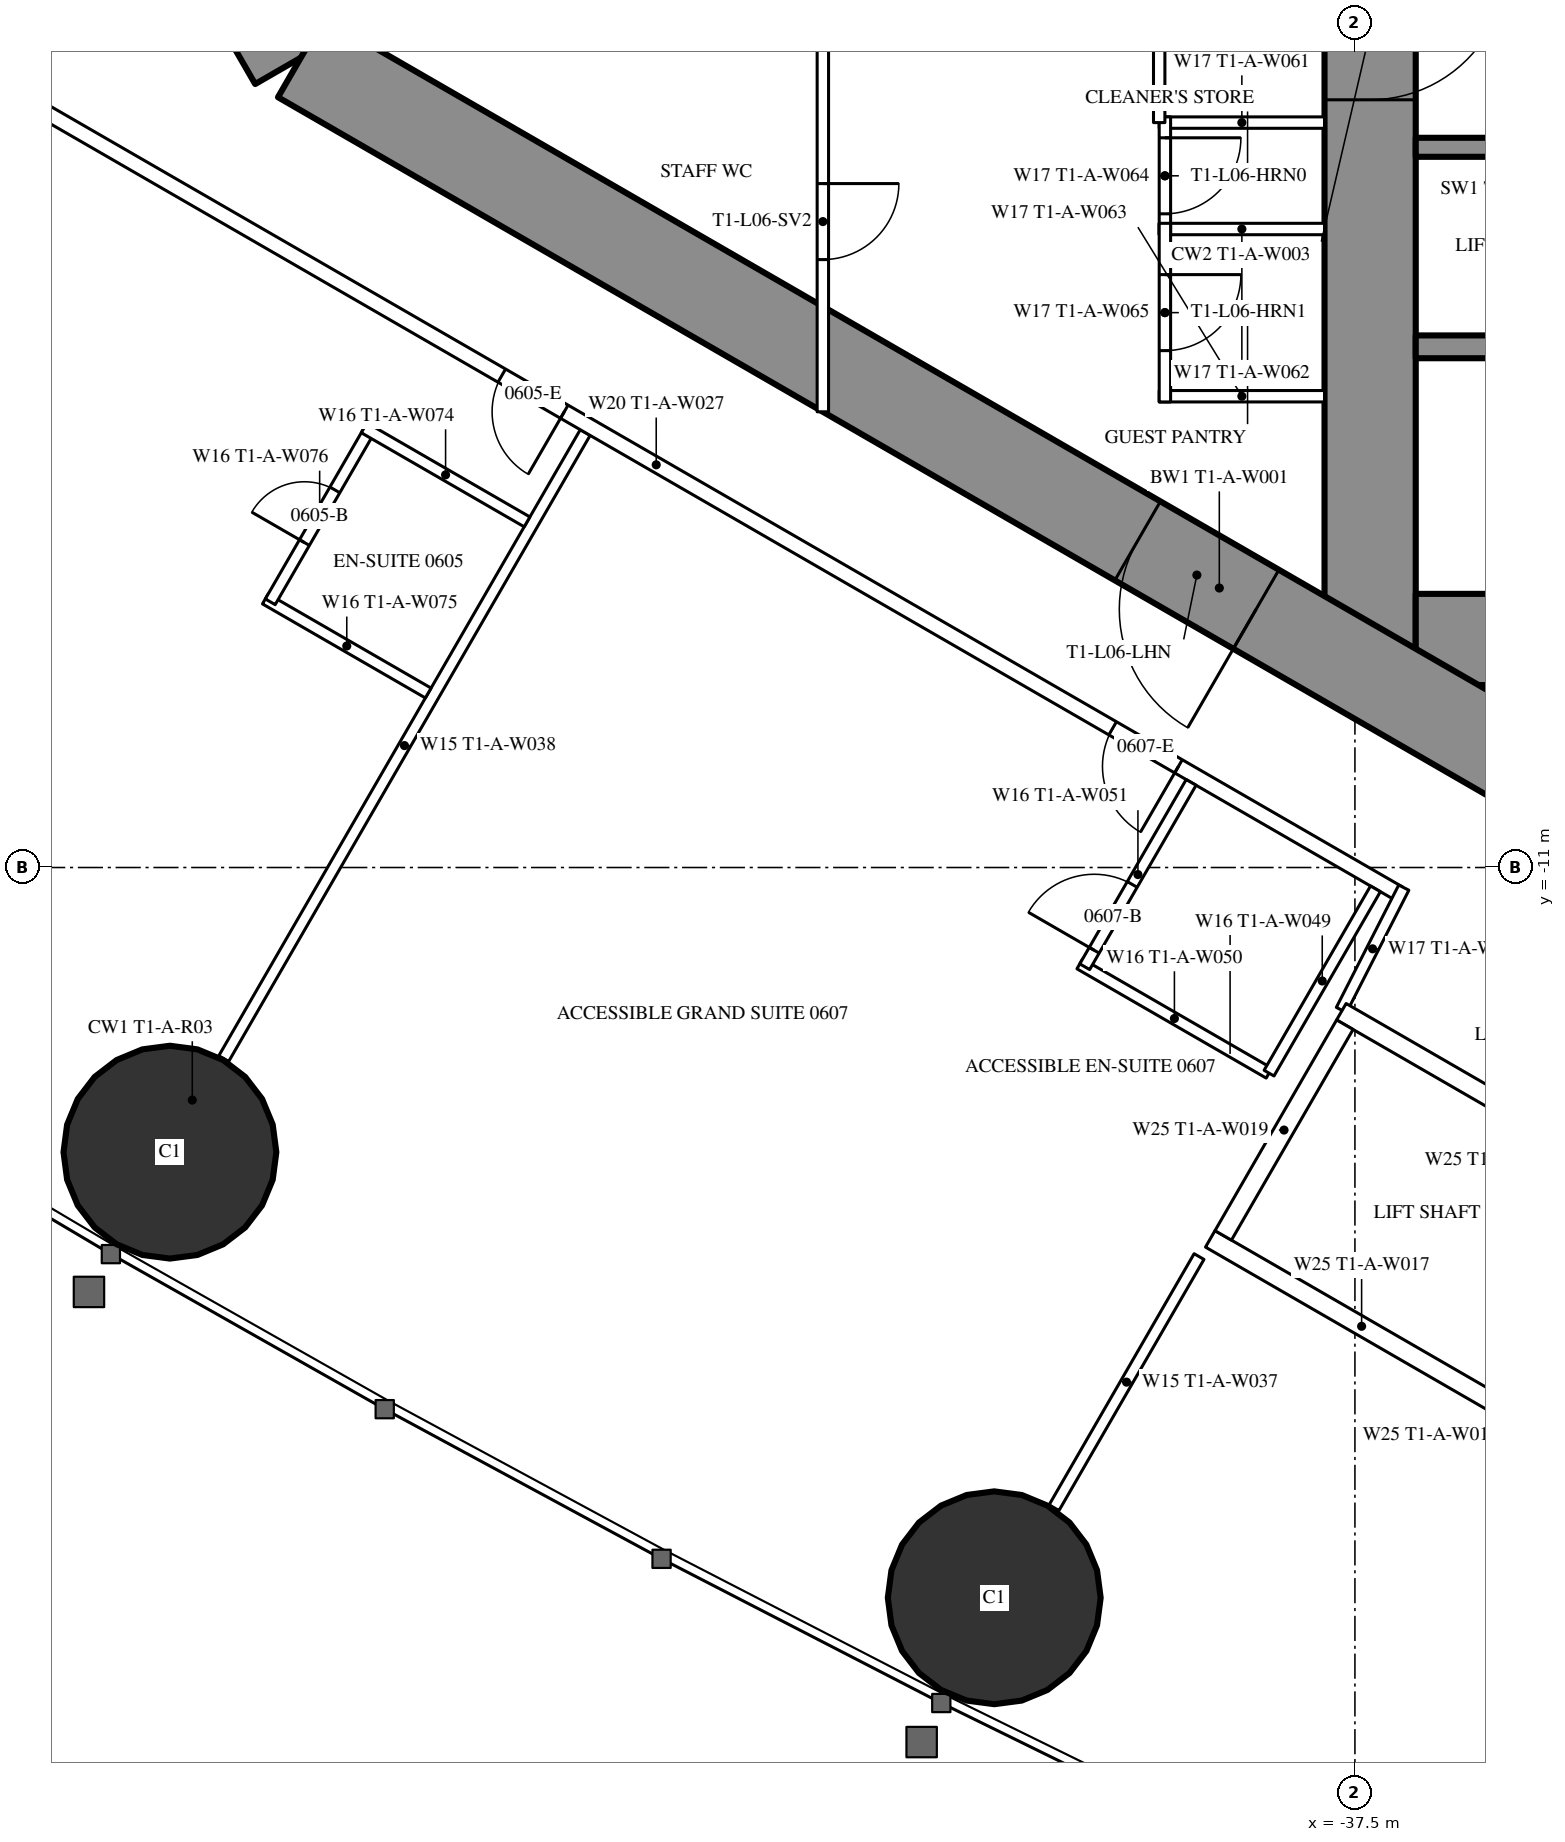
"""IFC4 building model, lengths in metres.
Left out: names, types, materials, properties, quantities, classifications, styles, units other than length and angle.
Written with IfcOpenShell. Run it as: python <this file> out.ifc"""

import sys

from ifc_helpers import new_model, si_unit, direction, frame, frame_2d, origin, origin_2d, place, context, subcontext, project, spatial, rectangle, hollow_circle, extrude, element, fill, save


model = new_model("IFC4")
c1 = context("Model", 3, precision=1e-05, world=origin(), true_north=direction((0.0, 1.0)))
c2 = subcontext(c1, "Body", "Model", "MODEL_VIEW")
j1 = project(units=[si_unit("LENGTHUNIT", "METRE"), si_unit("PLANEANGLEUNIT", "RADIAN")], contexts=[c1])
p1 = place(None, origin())
s1 = spatial("IfcSite", under=j1, at=p1, CompositionType="ELEMENT")
p2 = place(p1, origin())
s2 = spatial("IfcBuilding", under=s1, at=p2, CompositionType="ELEMENT")
p3 = place(p2, frame((0.0, 0.0, 28.5)))
s3 = spatial("IfcBuildingStorey", under=s2, at=p3, CompositionType="ELEMENT", Elevation=28.5)
for number, where, z_axis, x_axis in (
    (1, (-53.09, -14.745, 0.0), (0.0, 0.0, 1.0), (1.0, 0.0, 0.0)),
    (2, (-42.245, -20.607, 0.0), (0.0, 0.0, 1.0), (1.0, 0.0, 0.0)),
):
    element("IfcColumn", number, at=place(p3, frame(where, z_axis=z_axis, x_axis=x_axis)), inside=s3, PredefinedType="COLUMN", context=c2, shape_type="SweptSolid", body=[
        extrude(hollow_circle(Radius=1.4, WallThickness=0.12, at=origin_2d()), origin(), (0.0, 0.0, 1.0), 3.5),
    ])
p4 = place(p3, frame((-37.3, 8.6, 0.0), z_axis=(0.0, 0.0, 1.0), x_axis=(0.0, -1.0, 0.0)))
e3 = element("IfcWall", 3, at=p4, inside=s3, PredefinedType="SHEAR", context=c2, shape_type="SweptSolid", body=[
    extrude(rectangle(XDim=17.2, YDim=1.2, at=frame_2d((8.6, 0.0))), origin(), (0.0, 0.0, 1.0), 3.5),
])
p5 = place(p4, frame((7.7, 0.0, 0.0)))
e4 = element("IfcOpeningElement", 4, at=p5, cuts=e3, PredefinedType="OPENING", context=c2, shape_type="SweptSolid", body=[
    extrude(rectangle(XDim=1.8, YDim=2.2, at=frame_2d((0.9, 1.1))), frame((0.0, 0.61, 0.0), z_axis=(0.0, -1.0, 0.0), x_axis=(1.0, 0.0, 0.0)), (0.0, 0.0, 1.0), 1.22),
])
p6 = place(p3, frame((-28.3, -8.0, 0.0), z_axis=(0.0, 0.0, 1.0), x_axis=(-1.0, 0.0, 0.0)))
e5 = element("IfcWall", 5, at=p6, inside=s3, PredefinedType="SHEAR", context=c2, shape_type="SweptSolid", body=[
    extrude(rectangle(XDim=8.4, YDim=1.2, at=frame_2d((4.2, 0.0))), origin(), (0.0, 0.0, 1.0), 3.5),
])
p7 = place(p6, frame((0.25, 0.0, 0.0)))
e6 = element("IfcOpeningElement", 6, at=p7, cuts=e5, PredefinedType="OPENING", context=c2, shape_type="SweptSolid", body=[
    extrude(rectangle(XDim=1.0, YDim=2.2, at=frame_2d((0.5, 1.1))), frame((0.0, 0.61, 0.0), z_axis=(0.0, -1.0, 0.0), x_axis=(1.0, 0.0, 0.0)), (0.0, 0.0, 1.0), 1.22),
])
p8 = place(p3, frame((-28.3, -4.15, 0.0), z_axis=(0.0, 0.0, 1.0), x_axis=(-1.0, 0.0, 0.0)))
e7 = element("IfcWall", 7, at=p8, inside=s3, PredefinedType="SHEAR", context=c2, shape_type="SweptSolid", body=[
    extrude(rectangle(XDim=8.4, YDim=0.3, at=frame_2d((4.2, 0.0))), origin(), (0.0, 0.0, 1.0), 3.5),
])
p9 = place(p3, frame((-34.25, -1.525, 0.0), z_axis=(0.0, 0.0, 1.0), x_axis=(-1.0, 0.0, 0.0)))
e8 = element("IfcWall", 8, at=p9, inside=s3, PredefinedType="SHEAR", context=c2, shape_type="SweptSolid", body=[
    extrude(rectangle(XDim=2.45, YDim=0.25, at=frame_2d((1.225, 0.0))), origin(), (0.0, 0.0, 1.0), 3.5),
])
p10 = place(p3, frame((-27.2, 14.3, 0.0), z_axis=(0.0, 0.0, 1.0), x_axis=(-0.866026593062, -0.499997940104, 0.0)))
e9 = element("IfcWall", 9, at=p10, inside=s3, PredefinedType="SHEAR", context=c2, shape_type="SweptSolid", body=[
    extrude(rectangle(XDim=28.946, YDim=1.2, at=frame_2d((14.473, 0.0))), origin(), (0.0, 0.0, 1.0), 3.5),
])
p11 = place(p10, frame((4.6, 0.0, 0.0)))
e10 = element("IfcOpeningElement", 10, at=p11, cuts=e9, PredefinedType="OPENING", context=c2, shape_type="SweptSolid", body=[
    extrude(rectangle(XDim=1.0, YDim=2.2, at=frame_2d((0.5, 1.1))), frame((0.0, 0.61, 0.0), z_axis=(0.0, -1.0, 0.0), x_axis=(1.0, 0.0, 0.0)), (0.0, 0.0, 1.0), 1.22),
])
p12 = place(p10, frame((13.395, 0.0, 0.0)))
e11 = element("IfcOpeningElement", 11, at=p12, cuts=e9, PredefinedType="OPENING", context=c2, shape_type="SweptSolid", body=[
    extrude(rectangle(XDim=1.8, YDim=2.2, at=frame_2d((0.9, 1.1))), frame((0.0, 0.61, 0.0), z_axis=(0.0, -1.0, 0.0), x_axis=(1.0, 0.0, 0.0)), (0.0, 0.0, 1.0), 1.22),
])
p13 = place(p3, frame((-27.2, -14.3, 0.0), z_axis=(0.0, 0.0, 1.0), x_axis=(-0.866024021859, 0.500002393557, 0.0)))
e12 = element("IfcWall", 12, at=p13, inside=s3, PredefinedType="SHEAR", context=c2, shape_type="SweptSolid", body=[
    extrude(rectangle(XDim=27.907, YDim=1.2, at=frame_2d((13.954, 0.0))), origin(), (0.0, 0.0, 1.0), 3.5),
])
p14 = place(p13, frame((4.6, 0.0, 0.0)))
e13 = element("IfcOpeningElement", 13, at=p14, cuts=e12, PredefinedType="OPENING", context=c2, shape_type="SweptSolid", body=[
    extrude(rectangle(XDim=1.0, YDim=2.2, at=frame_2d((0.5, 1.1))), frame((0.0, 0.61, 0.0), z_axis=(0.0, -1.0, 0.0), x_axis=(1.0, 0.0, 0.0)), (0.0, 0.0, 1.0), 1.22),
])
p15 = place(p13, frame((13.395, 0.0, 0.0)))
e14 = element("IfcOpeningElement", 14, at=p15, cuts=e12, PredefinedType="OPENING", context=c2, shape_type="SweptSolid", body=[
    extrude(rectangle(XDim=1.8, YDim=2.2, at=frame_2d((0.9, 1.1))), frame((0.0, 0.61, 0.0), z_axis=(0.0, -1.0, 0.0), x_axis=(1.0, 0.0, 0.0)), (0.0, 0.0, 1.0), 1.22),
])
p16 = place(p3, frame((-47.627, -5.278, 0.0), z_axis=(0.0, 0.0, 1.0), x_axis=(-0.500009844318, -0.86601972009, 0.0)))
e15 = element("IfcWall", 15, at=p16, inside=s3, PredefinedType="PARTITIONING", context=c2, shape_type="SweptSolid", body=[
    extrude(rectangle(XDim=9.51, YDim=0.15, at=frame_2d((4.755, 0.0))), origin(), (0.0, 0.0, 1.0), 2.25),
])
p17 = place(p3, frame((-39.551, -16.118, 0.0), z_axis=(0.0, 0.0, 1.0), x_axis=(-0.499986503906, -0.866033195618, 0.0)))
e16 = element("IfcWall", 16, at=p17, inside=s3, PredefinedType="PARTITIONING", context=c2, shape_type="SweptSolid", body=[
    extrude(rectangle(XDim=3.815, YDim=0.15, at=frame_2d((1.907, 0.0))), origin(), (0.0, 0.0, 1.0), 3.25),
])
p18 = place(p3, frame((-36.92, -11.344, 0.0), z_axis=(0.0, 0.0, 1.0), x_axis=(-0.866028313256, 0.499994960614, 0.0)))
e17 = element("IfcWall", 17, at=p18, inside=s3, PredefinedType="PARTITIONING", context=c2, shape_type="SweptSolid", body=[
    extrude(rectangle(XDim=22.568, YDim=0.2, at=frame_2d((11.284, 0.0))), origin(), (0.0, 0.0, 1.0), 3.25),
])
p19 = place(p18, frame((12.68, 0.0, 0.0)))
e18 = element("IfcOpeningElement", 18, at=p19, cuts=e17, PredefinedType="OPENING", context=c2, shape_type="SweptSolid", body=[
    extrude(rectangle(XDim=0.95, YDim=2.2, at=frame_2d((0.475, 1.1))), frame((0.0, 0.11, 0.0), z_axis=(0.0, -1.0, 0.0), x_axis=(1.0, 0.0, 0.0)), (0.0, 0.0, 1.0), 0.22),
])
p20 = place(p18, frame((3.35, 0.0, 0.0)))
e19 = element("IfcOpeningElement", 19, at=p20, cuts=e17, PredefinedType="OPENING", context=c2, shape_type="SweptSolid", body=[
    extrude(rectangle(XDim=1.0, YDim=2.2, at=frame_2d((0.5, 1.1))), frame((0.0, 0.11, 0.0), z_axis=(0.0, -1.0, 0.0), x_axis=(1.0, 0.0, 0.0)), (0.0, 0.0, 1.0), 0.22),
])
p21 = place(p3, frame((-36.857, -11.265, 0.0), z_axis=(0.0, 0.0, 1.0), x_axis=(-0.454225294761, -0.890886851176, 0.0)))
e20 = element("IfcWall", 20, at=p21, inside=s3, PredefinedType="PARTITIONING", context=c2, shape_type="SweptSolid", body=[
    extrude(rectangle(XDim=1.807, YDim=0.15, at=frame_2d((0.904, 0.0))), origin(), (0.0, 0.0, 1.0), 3.25),
])
p22 = place(p3, frame((-49.692, -8.704, 0.0), z_axis=(0.0, 0.0, 1.0), x_axis=(-0.866073894602, 0.499916002032, 0.0)))
e21 = element("IfcWall", 21, at=p22, inside=s3, PredefinedType="PARTITIONING", context=c2, shape_type="SweptSolid", body=[
    extrude(rectangle(XDim=2.475, YDim=0.15, at=frame_2d((1.238, 0.0))), origin(), (0.0, 0.0, 1.0), 3.25),
])
p23 = place(p3, frame((-50.47, -5.253, 0.0), z_axis=(0.0, 0.0, 1.0), x_axis=(-0.500006934395, -0.866021400173, 0.0)))
e22 = element("IfcWall", 22, at=p23, inside=s3, PredefinedType="PARTITIONING", context=c2, shape_type="SweptSolid", body=[
    extrude(rectangle(XDim=2.6, YDim=0.15, at=frame_2d((1.3, 0.0))), origin(), (0.0, 0.0, 1.0), 3.25),
])
p24 = place(p23, frame((0.9, 0.0, 0.0)))
e23 = element("IfcOpeningElement", 23, at=p24, cuts=e22, PredefinedType="OPENING", context=c2, shape_type="SweptSolid", body=[
    extrude(rectangle(XDim=0.8, YDim=2.2, at=frame_2d((0.4, 1.1))), frame((0.0, 0.085, 0.0), z_axis=(0.0, -1.0, 0.0), x_axis=(1.0, 0.0, 0.0)), (0.0, 0.0, 1.0), 0.17),
])
p25 = place(p3, frame((-48.392, -6.453, 0.0), z_axis=(0.0, 0.0, 1.0), x_axis=(-0.86604923931, 0.499958713387, 0.0)))
e24 = element("IfcWall", 24, at=p25, inside=s3, PredefinedType="PARTITIONING", context=c2, shape_type="SweptSolid", body=[
    extrude(rectangle(XDim=2.475, YDim=0.15, at=frame_2d((1.237, 0.0))), origin(), (0.0, 0.0, 1.0), 3.25),
])
p26 = place(p3, frame((-38.63, -13.705, 0.0), z_axis=(0.0, 0.0, 1.0), x_axis=(-0.866018712932, 0.500011588718, 0.0)))
e25 = element("IfcWall", 25, at=p26, inside=s3, PredefinedType="PARTITIONING", context=c2, shape_type="SweptSolid", body=[
    extrude(rectangle(XDim=2.875, YDim=0.15, at=frame_2d((1.438, 0.0))), origin(), (0.0, 0.0, 1.0), 3.25),
])
p27 = place(p3, frame((-39.655, -9.88, 0.0), z_axis=(0.0, 0.0, 1.0), x_axis=(-0.500049511043, -0.865996816683, 0.0)))
e26 = element("IfcWall", 26, at=p27, inside=s3, PredefinedType="PARTITIONING", context=c2, shape_type="SweptSolid", body=[
    extrude(rectangle(XDim=2.8, YDim=0.15, at=frame_2d((1.4, 0.0))), origin(), (0.0, 0.0, 1.0), 3.25),
])
p28 = place(p27, frame((1.55, 0.0, 0.0)))
e27 = element("IfcOpeningElement", 27, at=p28, cuts=e26, PredefinedType="OPENING", context=c2, shape_type="SweptSolid", body=[
    extrude(rectangle(XDim=1.0, YDim=2.2, at=frame_2d((0.5, 1.1))), frame((0.0, 0.085, 0.0), z_axis=(0.0, -1.0, 0.0), x_axis=(1.0, 0.0, 0.0)), (0.0, 0.0, 1.0), 0.17),
])
p29 = place(p3, frame((-37.23, -11.281, 0.0), z_axis=(0.0, 0.0, 1.0), x_axis=(-0.500049511043, -0.865996816683, 0.0)))
e28 = element("IfcWall", 28, at=p29, inside=s3, PredefinedType="PARTITIONING", context=c2, shape_type="SweptSolid", body=[
    extrude(rectangle(XDim=2.8, YDim=0.15, at=frame_2d((1.4, 0.0))), origin(), (0.0, 0.0, 1.0), 3.25),
])
for number, where, z_axis, x_axis in (
    (29, (-37.9, -1.2, 0.0), (0.0, 0.0, 1.0), (-1.0, 0.0, 0.0)),
    (30, (-37.9, -2.6, 0.0), (0.0, 0.0, 1.0), (-1.0, 0.0, 0.0)),
    (31, (-37.9, -4.8, 0.0), (0.0, 0.0, 1.0), (-1.0, 0.0, 0.0)),
):
    element("IfcWall", number, at=place(p3, frame(where, z_axis=z_axis, x_axis=x_axis)), inside=s3, PredefinedType="PARTITIONING", context=c2, shape_type="SweptSolid", body=[
        extrude(rectangle(XDim=2.175, YDim=0.15, at=frame_2d((1.087, 0.0))), origin(), (0.0, 0.0, 1.0), 3.25),
    ])
p30 = place(p3, frame((-40.0, -1.125, 0.0), z_axis=(0.0, 0.0, 1.0), x_axis=(0.0, -1.0, 0.0)))
e32 = element("IfcWall", 32, at=p30, inside=s3, PredefinedType="PARTITIONING", context=c2, shape_type="SweptSolid", body=[
    extrude(rectangle(XDim=1.55, YDim=0.15, at=frame_2d((0.775, 0.0))), origin(), (0.0, 0.0, 1.0), 3.25),
])
p31 = place(p30, frame((0.275, 0.0, 0.0)))
e33 = element("IfcOpeningElement", 33, at=p31, cuts=e32, PredefinedType="OPENING", context=c2, shape_type="SweptSolid", body=[
    extrude(rectangle(XDim=1.0, YDim=2.2, at=frame_2d((0.5, 1.1))), frame((0.0, 0.085, 0.0), z_axis=(0.0, -1.0, 0.0), x_axis=(1.0, 0.0, 0.0)), (0.0, 0.0, 1.0), 0.17),
])
p32 = place(p3, frame((-40.0, -2.525, 0.0), z_axis=(0.0, 0.0, 1.0), x_axis=(0.0, -1.0, 0.0)))
e34 = element("IfcWall", 34, at=p32, inside=s3, PredefinedType="PARTITIONING", context=c2, shape_type="SweptSolid", body=[
    extrude(rectangle(XDim=2.35, YDim=0.15, at=frame_2d((1.175, 0.0))), origin(), (0.0, 0.0, 1.0), 3.25),
])
p33 = place(p32, frame((0.675, 0.0, 0.0)))
e35 = element("IfcOpeningElement", 35, at=p33, cuts=e34, PredefinedType="OPENING", context=c2, shape_type="SweptSolid", body=[
    extrude(rectangle(XDim=1.0, YDim=2.2, at=frame_2d((0.5, 1.1))), frame((0.0, 0.085, 0.0), z_axis=(0.0, -1.0, 0.0), x_axis=(1.0, 0.0, 0.0)), (0.0, 0.0, 1.0), 0.17),
])
p34 = place(p3, frame((-40.075, 6.174, 0.0), z_axis=(0.0, 0.0, 1.0), x_axis=(0.0, -1.0, 0.0)))
e36 = element("IfcWall", 36, at=p34, inside=s3, PredefinedType="PARTITIONING", context=c2, shape_type="SweptSolid", body=[
    extrude(rectangle(XDim=7.374, YDim=0.15, at=frame_2d((3.687, 0.0))), origin(), (0.0, 0.0, 1.0), 3.25),
])
p35 = place(p34, frame((2.787, 0.0, 0.0)))
e37 = element("IfcOpeningElement", 37, at=p35, cuts=e36, PredefinedType="OPENING", context=c2, shape_type="SweptSolid", body=[
    extrude(rectangle(XDim=1.8, YDim=2.2, at=frame_2d((0.9, 1.1))), frame((0.0, 0.085, 0.0), z_axis=(0.0, -1.0, 0.0), x_axis=(1.0, 0.0, 0.0)), (0.0, 0.0, 1.0), 0.17),
])
p36 = place(p3, frame((-44.5, 5.005, 0.0), z_axis=(0.0, 0.0, 1.0), x_axis=(0.0, -1.0, 0.0)))
e38 = element("IfcWall", 38, at=p36, inside=s3, PredefinedType="PARTITIONING", context=c2, shape_type="SweptSolid", body=[
    extrude(rectangle(XDim=10.009, YDim=0.15, at=frame_2d((5.005, 0.0))), origin(), (0.0, 0.0, 1.0), 2.45),
])
p37 = place(p36, frame((2.002, 0.0, 0.0)))
e39 = element("IfcOpeningElement", 39, at=p37, cuts=e38, PredefinedType="OPENING", context=c2, shape_type="SweptSolid", body=[
    extrude(rectangle(XDim=1.0, YDim=2.2, at=frame_2d((0.5, 1.1))), frame((0.0, 0.085, 0.0), z_axis=(0.0, -1.0, 0.0), x_axis=(1.0, 0.0, 0.0)), (0.0, 0.0, 1.0), 0.17),
])
p38 = place(p36, frame((7.007, 0.0, 0.0)))
e40 = element("IfcOpeningElement", 40, at=p38, cuts=e38, PredefinedType="OPENING", context=c2, shape_type="SweptSolid", body=[
    extrude(rectangle(XDim=1.0, YDim=2.2, at=frame_2d((0.5, 1.1))), frame((0.0, 0.085, 0.0), z_axis=(0.0, -1.0, 0.0), x_axis=(1.0, 0.0, 0.0)), (0.0, 0.0, 1.0), 0.17),
])
p39 = place(p3, frame((-33.696, -15.197, 0.0), z_axis=(0.0, 0.0, 1.0), x_axis=(-0.865976953817, 0.500083908417, 0.0)))
e41 = element("IfcWall", 41, at=p39, inside=s3, PredefinedType="PARTITIONING", context=c2, shape_type="SweptSolid", body=[
    extrude(rectangle(XDim=4.599, YDim=0.25, at=frame_2d((2.3, 0.0))), origin(), (0.0, 0.0, 1.0), 3.25),
])
p40 = place(p3, frame((-35.42, -18.186, 0.0), z_axis=(0.0, 0.0, 1.0), x_axis=(-0.865990227814, 0.50006092162, 0.0)))
e42 = element("IfcWall", 42, at=p40, inside=s3, PredefinedType="PARTITIONING", context=c2, shape_type="SweptSolid", body=[
    extrude(rectangle(XDim=4.6, YDim=0.25, at=frame_2d((2.3, 0.0))), origin(), (0.0, 0.0, 1.0), 3.25),
])
p41 = place(p3, frame((-37.633, -13.068, 0.0), z_axis=(0.0, 0.0, 1.0), x_axis=(-0.499872130319, -0.866099216793, 0.0)))
e43 = element("IfcWall", 43, at=p41, inside=s3, PredefinedType="PARTITIONING", context=c2, shape_type="SweptSolid", body=[
    extrude(rectangle(XDim=3.2, YDim=0.25, at=frame_2d((1.6, 0.0))), origin(), (0.0, 0.0, 1.0), 3.25),
])
p42 = place(p24, origin())
e44 = element("IfcDoor", 44, at=p42, inside=s3, OperationType="SINGLE_SWING_RIGHT", PredefinedType="DOOR", context=c2, shape_type="SweptSolid", body=[
    extrude(rectangle(XDim=0.8, YDim=2.2, at=frame_2d((0.4, 1.1))), frame((0.0, 0.025, 0.0), z_axis=(0.0, -1.0, 0.0), x_axis=(1.0, 0.0, 0.0)), (0.0, 0.0, 1.0), 0.05),
])
fill(e23, e44)
p43 = place(p19, origin())
e45 = element("IfcDoor", 45, at=p43, inside=s3, OperationType="SINGLE_SWING_LEFT", PredefinedType="DOOR", context=c2, shape_type="SweptSolid", body=[
    extrude(rectangle(XDim=0.95, YDim=2.2, at=frame_2d((0.475, 1.1))), frame((0.0, 0.025, 0.0), z_axis=(0.0, -1.0, 0.0), x_axis=(1.0, 0.0, 0.0)), (0.0, 0.0, 1.0), 0.05),
])
fill(e18, e45)
p44 = place(p28, origin())
e46 = element("IfcDoor", 46, at=p44, inside=s3, OperationType="SINGLE_SWING_RIGHT", PredefinedType="DOOR", context=c2, shape_type="SweptSolid", body=[
    extrude(rectangle(XDim=1.0, YDim=2.2, at=frame_2d((0.5, 1.1))), frame((0.0, 0.025, 0.0), z_axis=(0.0, -1.0, 0.0), x_axis=(1.0, 0.0, 0.0)), (0.0, 0.0, 1.0), 0.05),
])
fill(e27, e46)
p45 = place(p20, origin())
e47 = element("IfcDoor", 47, at=p45, inside=s3, OperationType="SINGLE_SWING_LEFT", PredefinedType="DOOR", context=c2, shape_type="SweptSolid", body=[
    extrude(rectangle(XDim=1.0, YDim=2.2, at=frame_2d((0.5, 1.1))), frame((0.0, 0.025, 0.0), z_axis=(0.0, -1.0, 0.0), x_axis=(1.0, 0.0, 0.0)), (0.0, 0.0, 1.0), 0.05),
])
fill(e19, e47)
p46 = place(p31, origin())
e48 = element("IfcDoor", 48, at=p46, inside=s3, OperationType="SINGLE_SWING_LEFT", PredefinedType="DOOR", context=c2, shape_type="SweptSolid", body=[
    extrude(rectangle(XDim=1.0, YDim=2.2, at=frame_2d((0.5, 1.1))), frame((0.0, 0.025, 0.0), z_axis=(0.0, -1.0, 0.0), x_axis=(1.0, 0.0, 0.0)), (0.0, 0.0, 1.0), 0.05),
])
fill(e33, e48)
p47 = place(p33, origin())
e49 = element("IfcDoor", 49, at=p47, inside=s3, OperationType="SINGLE_SWING_LEFT", PredefinedType="DOOR", context=c2, shape_type="SweptSolid", body=[
    extrude(rectangle(XDim=1.0, YDim=2.2, at=frame_2d((0.5, 1.1))), frame((0.0, 0.025, 0.0), z_axis=(0.0, -1.0, 0.0), x_axis=(1.0, 0.0, 0.0)), (0.0, 0.0, 1.0), 0.05),
])
fill(e35, e49)
p48 = place(p38, origin())
e50 = element("IfcDoor", 50, at=p48, inside=s3, OperationType="SINGLE_SWING_LEFT", PredefinedType="DOOR", context=c2, shape_type="SweptSolid", body=[
    extrude(rectangle(XDim=1.0, YDim=2.2, at=frame_2d((0.5, 1.1))), frame((0.0, 0.025, 0.0), z_axis=(0.0, -1.0, 0.0), x_axis=(1.0, 0.0, 0.0)), (0.0, 0.0, 1.0), 0.05),
])
fill(e40, e50)
p49 = place(p15, origin())
e51 = element("IfcDoor", 51, at=p49, inside=s3, OperationType="DOUBLE_DOOR_SINGLE_SWING", PredefinedType="DOOR", context=c2, shape_type="SweptSolid", body=[
    extrude(rectangle(XDim=1.8, YDim=2.2, at=frame_2d((0.9, 1.1))), frame((0.0, 0.025, 0.0), z_axis=(0.0, -1.0, 0.0), x_axis=(1.0, 0.0, 0.0)), (0.0, 0.0, 1.0), 0.05),
])
fill(e14, e51)
p50 = place(p5, origin())
e52 = element("IfcDoor", 52, at=p50, inside=s3, OperationType="DOUBLE_DOOR_SINGLE_SWING", PredefinedType="DOOR", context=c2, shape_type="SweptSolid", body=[
    extrude(rectangle(XDim=1.8, YDim=2.2, at=frame_2d((0.9, 1.1))), frame((0.0, 0.025, 0.0), z_axis=(0.0, -1.0, 0.0), x_axis=(1.0, 0.0, 0.0)), (0.0, 0.0, 1.0), 0.05),
])
fill(e4, e52)
save(model, sys.argv[1])
